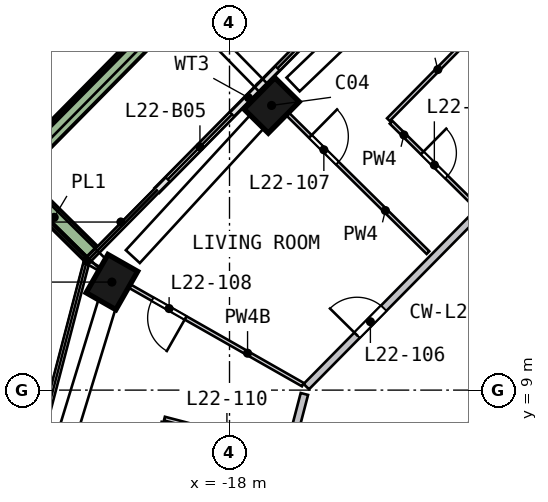
"""IFC4 building model, lengths in metres.
Left out: names, types, materials, properties, quantities, classifications, styles, units other than length and angle.
Written with IfcOpenShell. Run it as: python <this file> out.ifc"""

import sys

from ifc_helpers import new_model, si_unit, direction, frame, frame_2d, origin, origin_2d, place, context, subcontext, project, spatial, rectangle, extrude, element, fill, save


model = new_model("IFC4")
c1 = context("Model", 3, precision=1e-05, world=origin(), true_north=direction((0.0, 1.0)))
c2 = subcontext(c1, "Body", "Model", "MODEL_VIEW")
j1 = project(units=[si_unit("LENGTHUNIT", "METRE"), si_unit("PLANEANGLEUNIT", "RADIAN")], contexts=[c1])
p1 = place(None, origin())
s1 = spatial("IfcSite", under=j1, at=p1, CompositionType="ELEMENT")
p2 = place(p1, origin())
s2 = spatial("IfcBuilding", under=s1, at=p2, CompositionType="ELEMENT")
p3 = place(p2, frame((0.0, 0.0, 96.5)))
s3 = spatial("IfcBuildingStorey", under=s2, at=p3, CompositionType="ELEMENT", Elevation=96.5)
p4 = place(p3, frame((-16.798, 16.588, 0.0), z_axis=(-0.078255888, -0.080537401, 0.993674868), x_axis=(-0.698489901, -0.706754906, -0.112291409)))
e1 = element("IfcColumn", 1, at=p4, inside=s3, PredefinedType="COLUMN", context=c2, shape_type="SweptSolid", body=[
    extrude(rectangle(XDim=1.15, YDim=0.9, at=origin_2d()), origin(), (0.0, 0.0, 1.0), 3.21),
])
p5 = place(p3, frame((-21.027, 11.965, 0.0), z_axis=(-0.056031257, -0.100506543, 0.993357404), x_axis=(0.491046936, 0.863500308, 0.115065743)))
e2 = element("IfcColumn", 2, at=p5, inside=s3, PredefinedType="COLUMN", context=c2, shape_type="SweptSolid", body=[
    extrude(rectangle(XDim=1.15, YDim=0.9, at=origin_2d()), origin(), (0.0, 0.0, 1.0), 3.211),
])
p6 = place(p3, frame((-5.516, 13.717, 0.0), z_axis=(0.0, 0.0, 1.0), x_axis=(-0.707106781, -0.707106781, 0.0)))
e3 = element("IfcWall", 3, at=p6, inside=s3, PredefinedType="SHEAR", context=c2, shape_type="SweptSolid", body=[
    extrude(rectangle(XDim=11.598, YDim=0.8, at=frame_2d((5.799, 0.0))), origin(), (0.0, 0.0, 1.0), 3.5),
])
p7 = place(p3, frame((-14.766, 19.465, 0.0), z_axis=(0.0, 0.0, 1.0), x_axis=(-0.702631444, -0.711553971, 0.0)))
e4 = element("IfcWall", 4, at=p7, inside=s3, PredefinedType="SOLIDWALL", context=c2, shape_type="SweptSolid", body=[
    extrude(rectangle(XDim=3.475, YDim=0.15, at=frame_2d((1.738, 0.0))), origin(), (0.0, 0.0, 1.0), 2.425),
])
p8 = place(p7, frame((0.4, 0.0, 0.0)))
e5 = element("IfcOpeningElement", 5, at=p8, cuts=e4, PredefinedType="OPENING", context=c2, shape_type="SweptSolid", body=[
    extrude(rectangle(XDim=2.4, YDim=2.4, at=frame_2d((1.2, 1.2))), frame((0.0, 0.085, 0.0), z_axis=(0.0, -1.0, 0.0), x_axis=(1.0, 0.0, 0.0)), (0.0, 0.0, 1.0), 0.17),
])
p9 = place(p3, frame((-17.207, 16.992, 0.0), z_axis=(0.0, 0.0, 1.0), x_axis=(-0.702669036, -0.711516848, 0.0)))
e6 = element("IfcWall", 6, at=p9, inside=s3, PredefinedType="SOLIDWALL", context=c2, shape_type="SweptSolid", body=[
    extrude(rectangle(XDim=3.835, YDim=0.15, at=frame_2d((1.918, 0.0))), origin(), (0.0, 0.0, 1.0), 2.425),
])
p10 = place(p9, frame((1.035, 0.0, 0.0)))
e7 = element("IfcOpeningElement", 7, at=p10, cuts=e6, PredefinedType="OPENING", context=c2, shape_type="SweptSolid", body=[
    extrude(rectangle(XDim=2.4, YDim=2.4, at=frame_2d((1.2, 1.2))), frame((0.0, 0.085, 0.0), z_axis=(0.0, -1.0, 0.0), x_axis=(1.0, 0.0, 0.0)), (0.0, 0.0, 1.0), 0.17),
])
p11 = place(p3, frame((-16.091, 22.428, 0.0), z_axis=(0.0, 0.0, 1.0), x_axis=(-0.702659942, -0.71152583, 0.0)))
e8 = element("IfcWall", 8, at=p11, inside=s3, PredefinedType="SOLIDWALL", context=c2, shape_type="SweptSolid", body=[
    extrude(rectangle(XDim=11.153, YDim=0.5, at=frame_2d((5.576, 0.0))), origin(), (0.0, 0.0, 1.0), 0.7),
])
p12 = place(p3, frame((-23.573, 14.495, 0.0), z_axis=(0.0, 0.0, 1.0), x_axis=(0.71156988, -0.702615333, 0.0)))
e9 = element("IfcWall", 9, at=p12, inside=s3, PredefinedType="SOLIDWALL", context=c2, shape_type="SweptSolid", body=[
    extrude(rectangle(XDim=2.699, YDim=0.5, at=frame_2d((1.35, 0.0))), origin(), (0.0, 0.0, 1.0), 0.7),
])
p13 = place(p3, frame((-18.334, 0.079, 0.0), z_axis=(0.0, 0.0, 1.0), x_axis=(0.252736957, 0.967535028, 0.0)))
e10 = element("IfcWall", 10, at=p13, inside=s3, PredefinedType="SOLIDWALL", context=c2, shape_type="SweptSolid", body=[
    extrude(rectangle(XDim=9.116, YDim=0.2, at=frame_2d((4.558, 0.0))), origin(), (0.0, 0.0, 1.0), 3.19),
])
p14 = place(p13, frame((0.2, 0.0, 0.0)))
e11 = element("IfcOpeningElement", 11, at=p14, cuts=e10, PredefinedType="OPENING", context=c2, shape_type="SweptSolid", body=[
    extrude(rectangle(XDim=1.0, YDim=2.1, at=frame_2d((0.5, 1.05))), frame((0.0, 0.11, 0.0), z_axis=(0.0, -1.0, 0.0), x_axis=(1.0, 0.0, 0.0)), (0.0, 0.0, 1.0), 0.22),
])
p15 = place(p3, frame((-15.979, 9.092, 0.0), z_axis=(0.0, 0.0, 1.0), x_axis=(0.702650979, 0.71153468, 0.0)))
e12 = element("IfcWall", 12, at=p15, inside=s3, PredefinedType="SOLIDWALL", context=c2, shape_type="SweptSolid", body=[
    extrude(rectangle(XDim=9.316, YDim=0.2, at=frame_2d((4.658, 0.0))), origin(), (0.0, 0.0, 1.0), 3.19),
])
p16 = place(p15, frame((1.9, 0.0, 0.0)))
e13 = element("IfcOpeningElement", 13, at=p16, cuts=e12, PredefinedType="OPENING", context=c2, shape_type="SweptSolid", body=[
    extrude(rectangle(XDim=1.0, YDim=2.1, at=frame_2d((0.5, 1.05))), frame((0.0, 0.11, 0.0), z_axis=(0.0, -1.0, 0.0), x_axis=(1.0, 0.0, 0.0)), (0.0, 0.0, 1.0), 0.22),
])
p17 = place(p3, frame((-16.069, 9.143, 0.0), z_axis=(0.0, 0.0, 1.0), x_axis=(-0.869146509, 0.494554694, 0.0)))
e14 = element("IfcWall", 14, at=p17, inside=s3, PredefinedType="PARTITIONING", context=c2, shape_type="SweptSolid", body=[
    extrude(rectangle(XDim=6.476, YDim=0.1, at=frame_2d((3.238, 0.0))), origin(), (0.0, 0.0, 1.0), 2.69),
])
p18 = place(p17, frame((3.55, 0.0, 0.0)))
e15 = element("IfcOpeningElement", 15, at=p18, cuts=e14, PredefinedType="OPENING", context=c2, shape_type="SweptSolid", body=[
    extrude(rectangle(XDim=1.0, YDim=2.1, at=frame_2d((0.5, 1.05))), frame((0.0, 0.06, 0.0), z_axis=(0.0, -1.0, 0.0), x_axis=(1.0, 0.0, 0.0)), (0.0, 0.0, 1.0), 0.12),
])
p19 = place(p3, frame((-16.617, 7.441, 0.0), z_axis=(0.0, 0.0, 1.0), x_axis=(-0.967530526, 0.25275419, 0.0)))
e16 = element("IfcWall", 16, at=p19, inside=s3, PredefinedType="PARTITIONING", context=c2, shape_type="SweptSolid", body=[
    extrude(rectangle(XDim=3.2, YDim=0.1, at=frame_2d((1.6, 0.0))), origin(), (0.0, 0.0, 1.0), 3.19),
])
p20 = place(p19, frame((1.05, 0.0, 0.0)))
e17 = element("IfcOpeningElement", 17, at=p20, cuts=e16, PredefinedType="OPENING", context=c2, shape_type="SweptSolid", body=[
    extrude(rectangle(XDim=0.9, YDim=2.1, at=frame_2d((0.45, 1.05))), frame((0.0, 0.06, 0.0), z_axis=(0.0, -1.0, 0.0), x_axis=(1.0, 0.0, 0.0)), (0.0, 0.0, 1.0), 0.12),
])
p21 = place(p3, frame((-17.154, 16.94, 0.0), z_axis=(0.0, 0.0, 1.0), x_axis=(0.711519329, -0.702666525, 0.0)))
e18 = element("IfcWall", 18, at=p21, inside=s3, PredefinedType="PARTITIONING", context=c2, shape_type="SweptSolid", body=[
    extrude(rectangle(XDim=6.15, YDim=0.1, at=frame_2d((3.075, 0.0))), origin(), (0.0, 0.0, 1.0), 3.19),
])
p22 = place(p21, frame((1.8, 0.0, 0.0)))
e19 = element("IfcOpeningElement", 19, at=p22, cuts=e18, PredefinedType="OPENING", context=c2, shape_type="SweptSolid", body=[
    extrude(rectangle(XDim=1.0, YDim=2.1, at=frame_2d((0.5, 1.05))), frame((0.0, 0.06, 0.0), z_axis=(0.0, -1.0, 0.0), x_axis=(1.0, 0.0, 0.0)), (0.0, 0.0, 1.0), 0.12),
])
p23 = place(p3, frame((-13.748, 16.048, 0.0), z_axis=(0.0, 0.0, 1.0), x_axis=(0.711542382, -0.70264318, 0.0)))
e20 = element("IfcWall", 20, at=p23, inside=s3, PredefinedType="PARTITIONING", context=c2, shape_type="SweptSolid", body=[
    extrude(rectangle(XDim=3.1, YDim=0.1, at=frame_2d((1.55, 0.0))), origin(), (0.0, 0.0, 1.0), 3.19),
])
p24 = place(p23, frame((1.15, 0.0, 0.0)))
e21 = element("IfcOpeningElement", 21, at=p24, cuts=e20, PredefinedType="OPENING", context=c2, shape_type="SweptSolid", body=[
    extrude(rectangle(XDim=0.9, YDim=2.1, at=frame_2d((0.45, 1.05))), frame((0.0, 0.06, 0.0), z_axis=(0.0, -1.0, 0.0), x_axis=(1.0, 0.0, 0.0)), (0.0, 0.0, 1.0), 0.12),
])
p25 = place(p3, frame((-11.217, 18.753, 0.0), z_axis=(0.0, 0.0, 1.0), x_axis=(-0.702643586, -0.711541981, 0.0)))
e22 = element("IfcWall", 22, at=p25, inside=s3, PredefinedType="PARTITIONING", context=c2, shape_type="SweptSolid", body=[
    extrude(rectangle(XDim=3.704, YDim=0.1, at=frame_2d((1.852, 0.0))), origin(), (0.0, 0.0, 1.0), 3.19),
])
p26 = place(p8, origin())
e23 = element("IfcDoor", 23, at=p26, inside=s3, OperationType="SLIDING_TO_RIGHT", PredefinedType="DOOR", context=c2, shape_type="SweptSolid", body=[
    extrude(rectangle(XDim=2.4, YDim=2.4, at=frame_2d((1.2, 1.2))), frame((0.0, 0.025, 0.0), z_axis=(0.0, -1.0, 0.0), x_axis=(1.0, 0.0, 0.0)), (0.0, 0.0, 1.0), 0.05),
])
fill(e5, e23)
p27 = place(p10, origin())
e24 = element("IfcDoor", 24, at=p27, inside=s3, OperationType="SLIDING_TO_LEFT", PredefinedType="DOOR", context=c2, shape_type="SweptSolid", body=[
    extrude(rectangle(XDim=2.4, YDim=2.4, at=frame_2d((1.2, 1.2))), frame((0.0, 0.025, 0.0), z_axis=(0.0, -1.0, 0.0), x_axis=(1.0, 0.0, 0.0)), (0.0, 0.0, 1.0), 0.05),
])
fill(e7, e24)
p28 = place(p16, origin())
e25 = element("IfcDoor", 25, at=p28, inside=s3, OperationType="SINGLE_SWING_LEFT", PredefinedType="DOOR", context=c2, shape_type="SweptSolid", body=[
    extrude(rectangle(XDim=1.0, YDim=2.1, at=frame_2d((0.5, 1.05))), frame((0.0, 0.025, 0.0), z_axis=(0.0, -1.0, 0.0), x_axis=(1.0, 0.0, 0.0)), (0.0, 0.0, 1.0), 0.05),
])
fill(e13, e25)
p29 = place(p22, origin())
e26 = element("IfcDoor", 26, at=p29, inside=s3, OperationType="SINGLE_SWING_LEFT", PredefinedType="DOOR", context=c2, shape_type="SweptSolid", body=[
    extrude(rectangle(XDim=1.0, YDim=2.1, at=frame_2d((0.5, 1.05))), frame((0.0, 0.025, 0.0), z_axis=(0.0, -1.0, 0.0), x_axis=(1.0, 0.0, 0.0)), (0.0, 0.0, 1.0), 0.05),
])
fill(e19, e26)
p30 = place(p18, origin())
e27 = element("IfcDoor", 27, at=p30, inside=s3, OperationType="SINGLE_SWING_LEFT", PredefinedType="DOOR", context=c2, shape_type="SweptSolid", body=[
    extrude(rectangle(XDim=1.0, YDim=2.1, at=frame_2d((0.5, 1.05))), frame((0.0, 0.025, 0.0), z_axis=(0.0, -1.0, 0.0), x_axis=(1.0, 0.0, 0.0)), (0.0, 0.0, 1.0), 0.05),
])
fill(e15, e27)
p31 = place(p24, origin())
e28 = element("IfcDoor", 28, at=p31, inside=s3, OperationType="SINGLE_SWING_LEFT", PredefinedType="DOOR", context=c2, shape_type="SweptSolid", body=[
    extrude(rectangle(XDim=0.9, YDim=2.1, at=frame_2d((0.45, 1.05))), frame((0.0, 0.025, 0.0), z_axis=(0.0, -1.0, 0.0), x_axis=(1.0, 0.0, 0.0)), (0.0, 0.0, 1.0), 0.05),
])
fill(e21, e28)
save(model, sys.argv[1])
